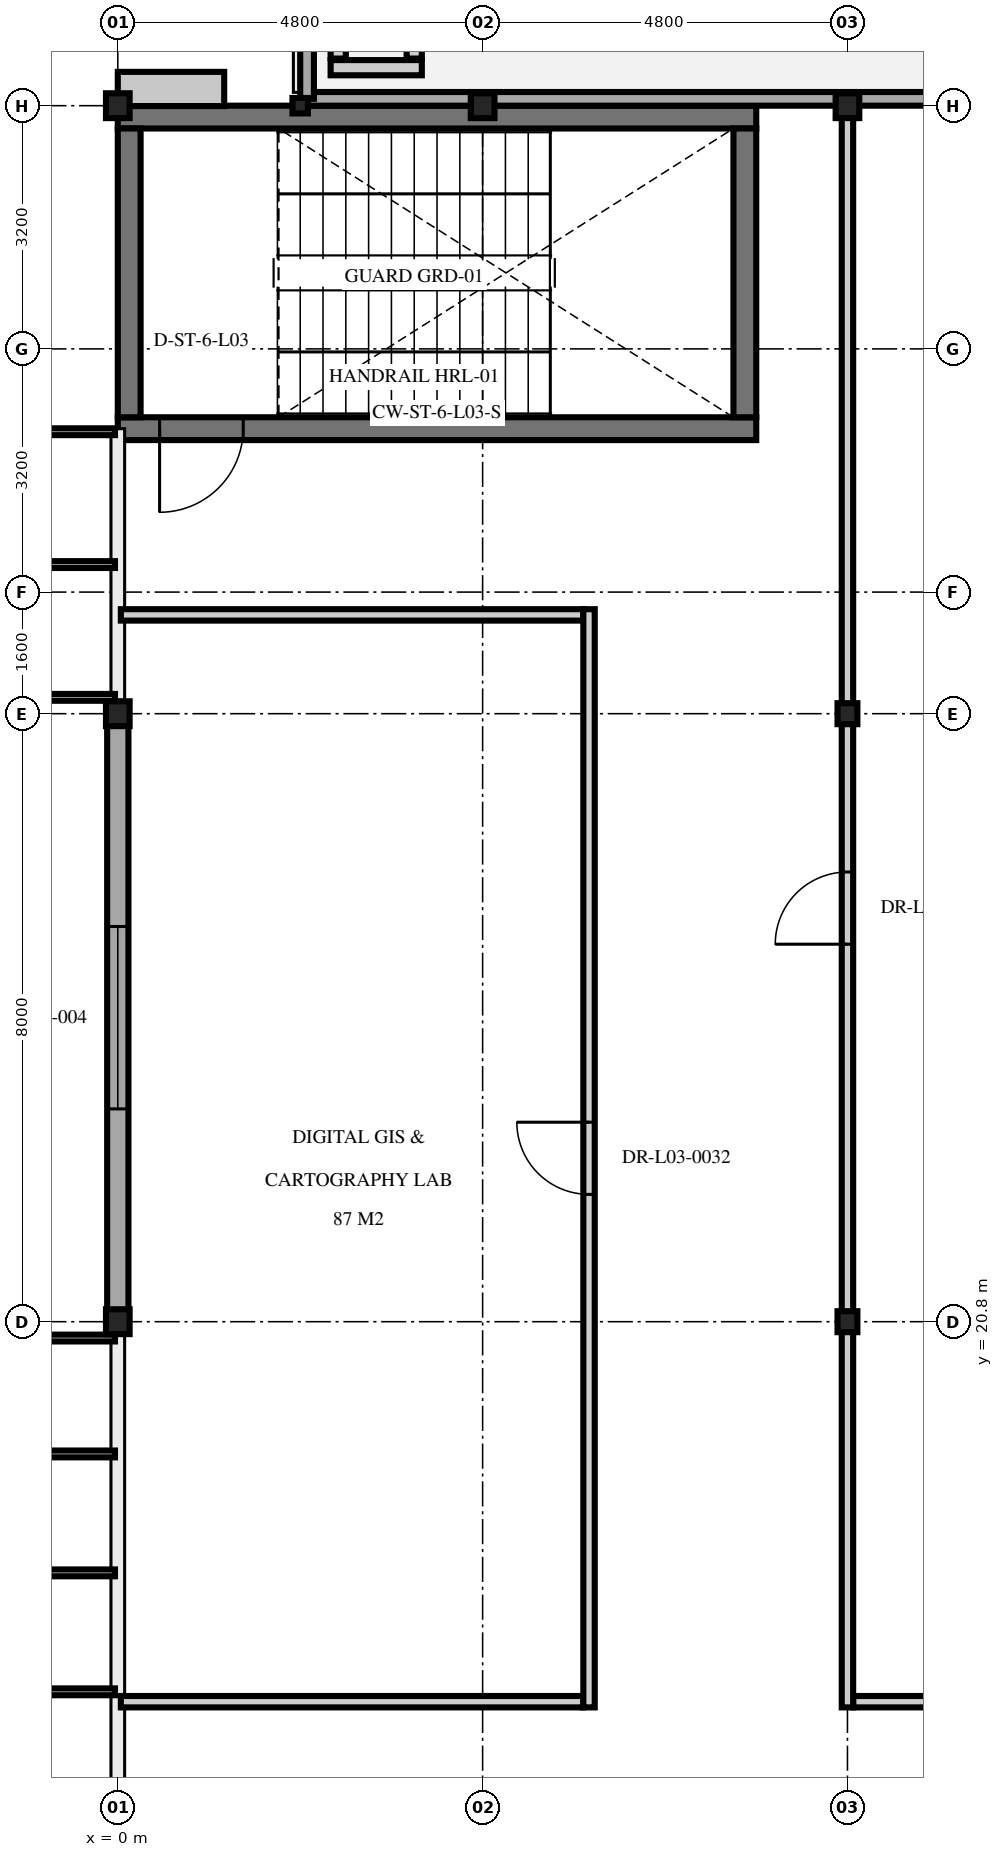
"""IFC4 building model, lengths in metres.
Left out: names, types, materials, properties, quantities, classifications, styles, units other than length and angle.
Written with IfcOpenShell. Run it as: python <this file> out.ifc"""

import sys

from ifc_helpers import new_model, si_unit, direction, frame, frame_2d, origin, origin_2d, place, context, subcontext, project, spatial, rectangle, i_section, extrude, element, fill, save


model = new_model("IFC4")
c1 = context("Model", 3, precision=1e-05, world=origin(), true_north=direction((0.0, 1.0)))
c2 = subcontext(c1, "Body", "Model", "MODEL_VIEW")
j1 = project(units=[si_unit("LENGTHUNIT", "METRE"), si_unit("PLANEANGLEUNIT", "RADIAN")], contexts=[c1])
p1 = place(None, origin())
s1 = spatial("IfcSite", under=j1, at=p1, CompositionType="ELEMENT")
p2 = place(p1, origin())
s2 = spatial("IfcBuilding", under=s1, at=p2, CompositionType="ELEMENT")
p3 = place(p2, frame((0.0, 0.0, 14.1)))
s3 = spatial("IfcBuildingStorey", under=s2, at=p3, CompositionType="ELEMENT", Elevation=14.1)
for number, where, z_axis, x_axis in (
    (1, (0.0, 36.8, 0.0), (0.0, 0.0, 1.0), (1.0, 0.0, 0.0)),
    (2, (4.8, 36.8, 0.0), (0.0, 0.0, 1.0), (1.0, 0.0, 0.0)),
    (3, (9.6, 36.8, 0.0), (0.0, 0.0, 1.0), (1.0, 0.0, 0.0)),
    (4, (0.0, 20.8, 0.0), (0.0, 0.0, 1.0), (1.0, 0.0, 0.0)),
    (5, (0.0, 28.8, 0.0), (0.0, 0.0, 1.0), (1.0, 0.0, 0.0)),
):
    element("IfcColumn", number, at=place(p3, frame(where, z_axis=z_axis, x_axis=x_axis)), inside=s3, PredefinedType="COLUMN", context=c2, shape_type="SweptSolid", body=[
        extrude(i_section(OverallWidth=0.311, OverallDepth=0.327, WebThickness=0.016, FlangeThickness=0.025, at=origin_2d()), origin(), (0.0, 0.0, 1.0), 4.5),
    ])
for number, where, z_axis, x_axis in (
    (6, (9.6, 20.8, 0.0), (0.0, 0.0, 1.0), (1.0, 0.0, 0.0)),
    (7, (9.6, 28.8, 0.0), (0.0, 0.0, 1.0), (1.0, 0.0, 0.0)),
):
    element("IfcColumn", number, at=place(p3, frame(where, z_axis=z_axis, x_axis=x_axis)), inside=s3, PredefinedType="COLUMN", context=c2, shape_type="SweptSolid", body=[
        extrude(i_section(OverallWidth=0.261, OverallDepth=0.276, WebThickness=0.015, FlangeThickness=0.025, at=origin_2d()), origin(), (0.0, 0.0, 1.0), 4.5),
    ])
p4 = place(p3, frame((2.4, 36.8, 0.0), z_axis=(0.0, 0.0, 1.0), x_axis=(1.0, 0.0, 0.0)))
e8 = element("IfcColumn", 8, at=p4, inside=s3, PredefinedType="COLUMN", context=c2, shape_type="SweptSolid", body=[
    extrude(i_section(OverallWidth=0.204, OverallDepth=0.203, WebThickness=0.007, FlangeThickness=0.011, at=origin_2d()), origin(), (0.0, 0.0, 1.0), 2.63),
])
p5 = place(p3, frame((8.4, 32.55, 0.0), z_axis=(0.0, 0.0, 1.0), x_axis=(-1.0, 0.0, 0.0)))
e9 = element("IfcWall", 9, at=p5, inside=s3, PredefinedType="SHEAR", context=c2, shape_type="SweptSolid", body=[
    extrude(rectangle(XDim=8.4, YDim=0.3, at=frame_2d((4.2, 0.0))), origin(), (0.0, 0.0, 1.0), 4.25),
])
p6 = place(p5, frame((6.75, 0.0, 0.0)))
e10 = element("IfcOpeningElement", 10, at=p6, cuts=e9, PredefinedType="OPENING", context=c2, shape_type="SweptSolid", body=[
    extrude(rectangle(XDim=1.1, YDim=2.2, at=frame_2d((0.55, 1.1))), frame((0.0, 0.16, 0.0), z_axis=(0.0, -1.0, 0.0), x_axis=(1.0, 0.0, 0.0)), (0.0, 0.0, 1.0), 0.32),
])
p7 = place(p3, frame((0.0, 36.65, 0.0), z_axis=(0.0, 0.0, 1.0), x_axis=(1.0, 0.0, 0.0)))
e11 = element("IfcWall", 11, at=p7, inside=s3, PredefinedType="SHEAR", context=c2, shape_type="SweptSolid", body=[
    extrude(rectangle(XDim=8.4, YDim=0.3, at=frame_2d((4.2, 0.0))), origin(), (0.0, 0.0, 1.0), 4.25),
])
for number, where, z_axis, x_axis in (
    (12, (0.15, 32.7, 0.0), (0.0, 0.0, 1.0), (0.0, 1.0, 0.0)),
    (13, (8.25, 36.5, 0.0), (0.0, 0.0, 1.0), (0.0, -1.0, 0.0)),
):
    element("IfcWall", number, at=place(p3, frame(where, z_axis=z_axis, x_axis=x_axis)), inside=s3, PredefinedType="SHEAR", context=c2, shape_type="SweptSolid", body=[
        extrude(rectangle(XDim=3.8, YDim=0.3, at=frame_2d((1.9, 0.0))), origin(), (0.0, 0.0, 1.0), 4.25),
    ])
p8 = place(p3, frame((4.0, 37.3, 0.0), z_axis=(0.0, 0.0, 1.0), x_axis=(-1.0, 0.0, 0.0)))
e14 = element("IfcWall", 14, at=p8, inside=s3, PredefinedType="PARTITIONING", context=c2, shape_type="SweptSolid", body=[
    extrude(rectangle(XDim=1.2, YDim=0.2, at=frame_2d((0.6, 0.0))), origin(), (0.0, 0.0, 1.0), 2.105),
])
for number, where, z_axis, x_axis in (
    (15, (2.9, 37.42, 0.0), (0.0, 0.0, 1.0), (0.0, 1.0, 0.0)),
    (16, (3.9, 38.18, 0.0), (0.0, 0.0, 1.0), (0.0, -1.0, 0.0)),
):
    element("IfcWall", number, at=place(p3, frame(where, z_axis=z_axis, x_axis=x_axis)), inside=s3, PredefinedType="PARTITIONING", context=c2, shape_type="SweptSolid", body=[
        extrude(rectangle(XDim=0.76, YDim=0.2, at=frame_2d((0.38, 0.0))), origin(), (0.0, 0.0, 1.0), 2.105),
    ])
p9 = place(p3, frame((0.0, 20.715, 0.0), z_axis=(0.0, 0.0, 1.0), x_axis=(0.0, 1.0, 0.0)))
e17 = element("IfcWall", 17, at=p9, inside=s3, PredefinedType="SOLIDWALL", context=c2, shape_type="SweptSolid", body=[
    extrude(rectangle(XDim=8.17, YDim=0.28, at=frame_2d((4.085, 0.0))), origin(), (0.0, 0.0, 1.0), 3.675),
])
p10 = place(p9, frame((2.885, 0.0, 0.95)))
e18 = element("IfcOpeningElement", 18, at=p10, cuts=e17, PredefinedType="OPENING", context=c2, shape_type="SweptSolid", body=[
    extrude(rectangle(XDim=2.4, YDim=2.1, at=frame_2d((1.2, 1.05))), frame((0.0, 0.15, 0.0), z_axis=(0.0, -1.0, 0.0), x_axis=(1.0, 0.0, 0.0)), (0.0, 0.0, 1.0), 0.3),
])
p11 = place(p3, frame((21.51, 36.89, 2.85), z_axis=(0.0, 0.0, 1.0), x_axis=(-1.0, 0.0, 0.0)))
e19 = element("IfcWall", 19, at=p11, inside=s3, PredefinedType="PARAPET", context=c2, shape_type="SweptSolid", body=[
    extrude(rectangle(XDim=19.02, YDim=0.18, at=frame_2d((9.51, 0.0))), origin(), (0.0, 0.0, 1.0), 0.45),
])
p12 = place(p3, frame((2.49, 36.89, 2.85), z_axis=(0.0, 0.0, 1.0), x_axis=(0.0, 1.0, 0.0)))
e20 = element("IfcWall", 20, at=p12, inside=s3, PredefinedType="PARAPET", context=c2, shape_type="SweptSolid", body=[
    extrude(rectangle(XDim=4.62, YDim=0.18, at=frame_2d((2.31, 0.0))), origin(), (0.0, 0.0, 1.0), 0.45),
])
p13 = place(p3, frame((0.04, 15.8, 0.0), z_axis=(0.0, 0.0, 1.0), x_axis=(1.0, 0.0, 0.0)))
e21 = element("IfcWall", 21, at=p13, inside=s3, PredefinedType="PARTITIONING", context=c2, shape_type="SweptSolid", body=[
    extrude(rectangle(XDim=6.085, YDim=0.15, at=frame_2d((3.042, 0.0))), origin(), (0.0, 0.0, 1.0), 3.625),
])
p14 = place(p3, frame((0.04, 30.1, 0.0), z_axis=(0.0, 0.0, 1.0), x_axis=(1.0, 0.0, 0.0)))
e22 = element("IfcWall", 22, at=p14, inside=s3, PredefinedType="PARTITIONING", context=c2, shape_type="SweptSolid", body=[
    extrude(rectangle(XDim=6.085, YDim=0.15, at=frame_2d((3.042, 0.0))), origin(), (0.0, 0.0, 1.0), 3.775),
])
p15 = place(p3, frame((6.2, 15.725, 0.0), z_axis=(0.0, 0.0, 1.0), x_axis=(0.0, 1.0, 0.0)))
e23 = element("IfcWall", 23, at=p15, inside=s3, PredefinedType="PARTITIONING", context=c2, shape_type="SweptSolid", body=[
    extrude(rectangle(XDim=14.45, YDim=0.15, at=frame_2d((7.225, 0.0))), origin(), (0.0, 0.0, 1.0), 3.625),
])
p16 = place(p15, frame((6.75, 0.0, 0.0)))
e24 = element("IfcOpeningElement", 24, at=p16, cuts=e23, PredefinedType="OPENING", context=c2, shape_type="SweptSolid", body=[
    extrude(rectangle(XDim=0.95, YDim=2.15, at=frame_2d((0.475, 1.075))), frame((0.0, 0.085, 0.0), z_axis=(0.0, -1.0, 0.0), x_axis=(1.0, 0.0, 0.0)), (0.0, 0.0, 1.0), 0.17),
])
p17 = place(p3, frame((9.675, 15.8, 0.0), z_axis=(0.0, 0.0, 1.0), x_axis=(1.0, 0.0, 0.0)))
e25 = element("IfcWall", 25, at=p17, inside=s3, PredefinedType="PARTITIONING", context=c2, shape_type="SweptSolid", body=[
    extrude(rectangle(XDim=16.45, YDim=0.15, at=frame_2d((8.225, 0.0))), origin(), (0.0, 0.0, 1.0), 3.625),
])
p18 = place(p3, frame((9.6, 15.725, 0.0), z_axis=(0.0, 0.0, 1.0), x_axis=(0.0, 1.0, 0.0)))
e26 = element("IfcWall", 26, at=p18, inside=s3, PredefinedType="PARTITIONING", context=c2, shape_type="SweptSolid", body=[
    extrude(rectangle(XDim=21.035, YDim=0.15, at=frame_2d((10.518, 0.0))), origin(), (0.0, 0.0, 1.0), 3.675),
])
p19 = place(p18, frame((10.042, 0.0, 0.0)))
e27 = element("IfcOpeningElement", 27, at=p19, cuts=e26, PredefinedType="OPENING", context=c2, shape_type="SweptSolid", body=[
    extrude(rectangle(XDim=0.95, YDim=2.15, at=frame_2d((0.475, 1.075))), frame((0.0, 0.085, 0.0), z_axis=(0.0, -1.0, 0.0), x_axis=(1.0, 0.0, 0.0)), (0.0, 0.0, 1.0), 0.17),
])
p20 = place(p6, origin())
e28 = element("IfcDoor", 28, at=p20, inside=s3, OperationType="SINGLE_SWING_RIGHT", PredefinedType="DOOR", context=c2, shape_type="SweptSolid", body=[
    extrude(rectangle(XDim=1.1, YDim=2.2, at=frame_2d((0.55, 1.1))), frame((0.0, 0.025, 0.0), z_axis=(0.0, -1.0, 0.0), x_axis=(1.0, 0.0, 0.0)), (0.0, 0.0, 1.0), 0.05),
])
fill(e10, e28)
p21 = place(p10, origin())
e29 = element("IfcWindow", 29, at=p21, inside=s3, PartitioningType="SINGLE_PANEL", PredefinedType="WINDOW", context=c2, shape_type="SweptSolid", body=[
    extrude(rectangle(XDim=2.4, YDim=2.1, at=frame_2d((1.2, 1.05))), frame((0.0, 0.03, 0.0), z_axis=(0.0, -1.0, 0.0), x_axis=(1.0, 0.0, 0.0)), (0.0, 0.0, 1.0), 0.06),
])
fill(e18, e29)
p22 = place(p16, origin())
e30 = element("IfcDoor", 30, at=p22, inside=s3, OperationType="SINGLE_SWING_RIGHT", PredefinedType="DOOR", context=c2, shape_type="SweptSolid", body=[
    extrude(rectangle(XDim=0.95, YDim=2.15, at=frame_2d((0.475, 1.075))), frame((0.0, 0.025, 0.0), z_axis=(0.0, -1.0, 0.0), x_axis=(1.0, 0.0, 0.0)), (0.0, 0.0, 1.0), 0.05),
])
fill(e24, e30)
p23 = place(p19, origin())
e31 = element("IfcDoor", 31, at=p23, inside=s3, OperationType="SINGLE_SWING_LEFT", PredefinedType="DOOR", context=c2, shape_type="SweptSolid", body=[
    extrude(rectangle(XDim=0.95, YDim=2.15, at=frame_2d((0.475, 1.075))), frame((0.0, 0.025, 0.0), z_axis=(0.0, -1.0, 0.0), x_axis=(1.0, 0.0, 0.0)), (0.0, 0.0, 1.0), 0.05),
])
fill(e27, e31)
save(model, sys.argv[1])
